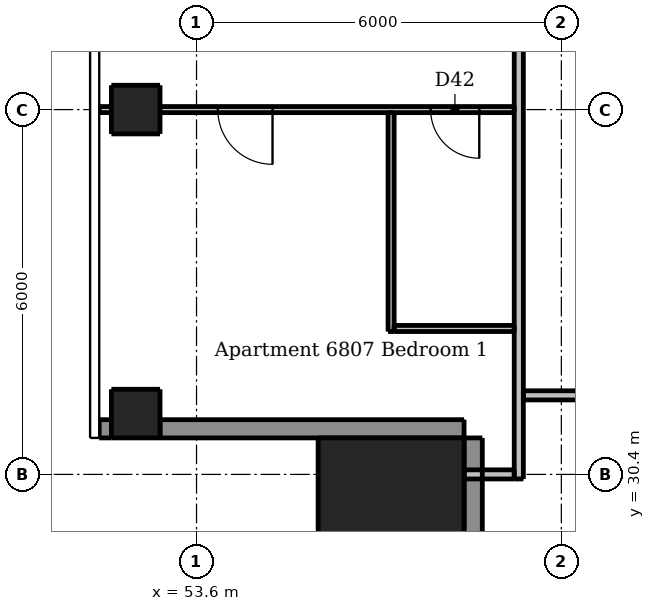
"""IFC4 building model, lengths in metres.
Left out: names, types, materials, properties, quantities, classifications, styles, units other than length and angle.
Written with IfcOpenShell. Run it as: python <this file> out.ifc"""

import sys

from ifc_helpers import new_model, si_unit, direction, frame, frame_2d, origin, origin_2d, place, context, subcontext, project, spatial, rectangle, extrude, element, fill, save


model = new_model("IFC4")
c1 = context("Model", 3, precision=1e-05, world=origin(), true_north=direction((0.0, 1.0)))
c2 = subcontext(c1, "Body", "Model", "MODEL_VIEW")
j1 = project(units=[si_unit("LENGTHUNIT", "METRE"), si_unit("PLANEANGLEUNIT", "RADIAN")], contexts=[c1])
p1 = place(None, origin())
s1 = spatial("IfcSite", under=j1, at=p1, CompositionType="ELEMENT")
p2 = place(p1, origin())
s2 = spatial("IfcBuilding", under=s1, at=p2, CompositionType="ELEMENT")
p3 = place(p2, frame((0.0, 0.0, 255.4)))
s3 = spatial("IfcBuildingStorey", under=s2, at=p3, CompositionType="ELEMENT", Elevation=255.4)
for number, where, z_axis, x_axis in (
    (1, (52.6, 31.4, 0.0), (0.0, 0.0, 1.0), (1.0, 0.0, 0.0)),
    (2, (52.6, 36.4, 0.0), (0.0, 0.0, 1.0), (1.0, 0.0, 0.0)),
):
    element("IfcColumn", number, at=place(p3, frame(where, z_axis=z_axis, x_axis=x_axis)), inside=s3, PredefinedType="COLUMN", context=c2, shape_type="SweptSolid", body=[
        extrude(rectangle(XDim=0.8, YDim=0.8, at=origin_2d()), origin(), (0.0, 0.0, 1.0), 3.05),
    ])
p4 = place(p3, frame((56.8, 29.8, 0.0), z_axis=(0.0, 0.0, 1.0), x_axis=(1.0, 0.0, 0.0)))
e3 = element("IfcColumn", 3, at=p4, inside=s3, PredefinedType="COLUMN", context=c2, shape_type="SweptSolid", body=[
    extrude(rectangle(XDim=2.4, YDim=2.4, at=origin_2d()), origin(), (0.0, 0.0, 1.0), 3.3),
])
p5 = place(p3, frame((52.0, 31.15, 0.0), z_axis=(0.0, 0.0, 1.0), x_axis=(1.0, 0.0, 0.0)))
e4 = element("IfcWall", 4, at=p5, inside=s3, PredefinedType="SOLIDWALL", context=c2, shape_type="SweptSolid", body=[
    extrude(rectangle(XDim=0.2, YDim=0.3, at=frame_2d((0.1, 0.0))), origin(), (0.0, 0.0, 1.0), 3.05),
])
p6 = place(p3, frame((53.0, 31.15, 0.0), z_axis=(0.0, 0.0, 1.0), x_axis=(1.0, 0.0, 0.0)))
e5 = element("IfcWall", 5, at=p6, inside=s3, PredefinedType="SOLIDWALL", context=c2, shape_type="SweptSolid", body=[
    extrude(rectangle(XDim=5.0, YDim=0.3, at=frame_2d((2.5, 0.0))), origin(), (0.0, 0.0, 1.0), 3.05),
])
p7 = place(p3, frame((58.15, 31.0, 0.0), z_axis=(0.0, 0.0, 1.0), x_axis=(0.0, -1.0, 0.0)))
e6 = element("IfcWall", 6, at=p7, inside=s3, PredefinedType="SOLIDWALL", context=c2, shape_type="SweptSolid", body=[
    extrude(rectangle(XDim=6.0, YDim=0.3, at=frame_2d((3.0, 0.0))), origin(), (0.0, 0.0, 1.0), 3.05),
])
p8 = place(p7, frame((1.8, 0.0, 0.15)))
e7 = element("IfcOpeningElement", 7, at=p8, cuts=e6, PredefinedType="OPENING", context=c2, shape_type="SweptSolid", body=[
    extrude(rectangle(XDim=2.4, YDim=2.1, at=frame_2d((1.2, 1.05))), frame((0.0, 0.16, 0.0), z_axis=(0.0, -1.0, 0.0), x_axis=(1.0, 0.0, 0.0)), (0.0, 0.0, 1.0), 0.32),
])
p9 = place(p3, frame((56.8, 32.75, 0.0), z_axis=(0.0, 0.0, 1.0), x_axis=(0.0, 1.0, 0.0)))
e8 = element("IfcWall", 8, at=p9, inside=s3, PredefinedType="PARTITIONING", context=c2, shape_type="SweptSolid", body=[
    extrude(rectangle(XDim=3.6, YDim=0.1, at=frame_2d((1.8, 0.0))), origin(), (0.0, 0.0, 1.0), 3.05),
])
p10 = place(p3, frame((58.825, 36.4, 0.0), z_axis=(0.0, 0.0, 1.0), x_axis=(-1.0, 0.0, 0.0)))
e9 = element("IfcWall", 9, at=p10, inside=s3, PredefinedType="PARTITIONING", context=c2, shape_type="SweptSolid", body=[
    extrude(rectangle(XDim=6.825, YDim=0.1, at=frame_2d((3.413, 0.0))), origin(), (0.0, 0.0, 1.0), 2.516),
])
p11 = place(p10, frame((3.975, 0.0, 0.0)))
e10 = element("IfcOpeningElement", 10, at=p11, cuts=e9, PredefinedType="OPENING", context=c2, shape_type="SweptSolid", body=[
    extrude(rectangle(XDim=0.9, YDim=2.1, at=frame_2d((0.45, 1.05))), frame((0.0, 0.06, 0.0), z_axis=(0.0, -1.0, 0.0), x_axis=(1.0, 0.0, 0.0)), (0.0, 0.0, 1.0), 0.12),
])
p12 = place(p10, frame((0.575, 0.0, 0.0)))
e11 = element("IfcOpeningElement", 11, at=p12, cuts=e9, PredefinedType="OPENING", context=c2, shape_type="SweptSolid", body=[
    extrude(rectangle(XDim=0.8, YDim=2.1, at=frame_2d((0.4, 1.05))), frame((0.0, 0.06, 0.0), z_axis=(0.0, -1.0, 0.0), x_axis=(1.0, 0.0, 0.0)), (0.0, 0.0, 1.0), 0.12),
])
p13 = place(p3, frame((56.85, 32.8, 0.0), z_axis=(0.0, 0.0, 1.0), x_axis=(1.0, 0.0, 0.0)))
e12 = element("IfcWall", 12, at=p13, inside=s3, PredefinedType="PARTITIONING", context=c2, shape_type="SweptSolid", body=[
    extrude(rectangle(XDim=1.975, YDim=0.1, at=frame_2d((0.987, 0.0))), origin(), (0.0, 0.0, 1.0), 3.05),
])
p14 = place(p3, frame((58.9, 30.325, 0.0), z_axis=(0.0, 0.0, 1.0), x_axis=(0.0, 1.0, 0.0)))
e13 = element("IfcWall", 13, at=p14, inside=s3, PredefinedType="PARTITIONING", context=c2, shape_type="SweptSolid", body=[
    extrude(rectangle(XDim=30.85, YDim=0.15, at=frame_2d((15.425, 0.0))), origin(), (0.0, 0.0, 1.0), 3.05),
])
p15 = place(p14, frame((7.375, 0.0, 0.0)))
e14 = element("IfcOpeningElement", 14, at=p15, cuts=e13, PredefinedType="OPENING", context=c2, shape_type="SweptSolid", body=[
    extrude(rectangle(XDim=1.0, YDim=2.1, at=frame_2d((0.5, 1.05))), frame((0.0, 0.085, 0.0), z_axis=(0.0, -1.0, 0.0), x_axis=(1.0, 0.0, 0.0)), (0.0, 0.0, 1.0), 0.17),
])
p16 = place(p14, frame((26.925, 0.0, 0.0)))
e15 = element("IfcOpeningElement", 15, at=p16, cuts=e13, PredefinedType="OPENING", context=c2, shape_type="SweptSolid", body=[
    extrude(rectangle(XDim=1.0, YDim=2.1, at=frame_2d((0.5, 1.05))), frame((0.0, 0.085, 0.0), z_axis=(0.0, -1.0, 0.0), x_axis=(1.0, 0.0, 0.0)), (0.0, 0.0, 1.0), 0.17),
])
p17 = place(p3, frame((89.525, 31.7, 0.0), z_axis=(0.0, 0.0, 1.0), x_axis=(-1.0, 0.0, 0.0)))
e16 = element("IfcWall", 16, at=p17, inside=s3, PredefinedType="PARTITIONING", context=c2, shape_type="SweptSolid", body=[
    extrude(rectangle(XDim=30.55, YDim=0.15, at=frame_2d((15.275, 0.0))), origin(), (0.0, 0.0, 1.0), 3.05),
])
p18 = place(p17, frame((26.775, 0.0, 0.0)))
e17 = element("IfcOpeningElement", 17, at=p18, cuts=e16, PredefinedType="OPENING", context=c2, shape_type="SweptSolid", body=[
    extrude(rectangle(XDim=1.0, YDim=2.1, at=frame_2d((0.5, 1.05))), frame((0.0, 0.085, 0.0), z_axis=(0.0, -1.0, 0.0), x_axis=(1.0, 0.0, 0.0)), (0.0, 0.0, 1.0), 0.17),
])
p19 = place(p17, frame((6.925, 0.0, 0.0)))
e18 = element("IfcOpeningElement", 18, at=p19, cuts=e16, PredefinedType="OPENING", context=c2, shape_type="SweptSolid", body=[
    extrude(rectangle(XDim=1.0, YDim=2.1, at=frame_2d((0.5, 1.05))), frame((0.0, 0.085, 0.0), z_axis=(0.0, -1.0, 0.0), x_axis=(1.0, 0.0, 0.0)), (0.0, 0.0, 1.0), 0.17),
])
p20 = place(p3, frame((58.0, 30.4, 0.0), z_axis=(0.0, 0.0, 1.0), x_axis=(1.0, 0.0, 0.0)))
e19 = element("IfcWall", 19, at=p20, inside=s3, PredefinedType="PARTITIONING", context=c2, shape_type="SweptSolid", body=[
    extrude(rectangle(XDim=0.825, YDim=0.15, at=frame_2d((0.413, 0.0))), origin(), (0.0, 0.0, 1.0), 3.05),
])
p21 = place(p11, origin())
e20 = element("IfcDoor", 20, at=p21, inside=s3, OperationType="SINGLE_SWING_LEFT", PredefinedType="DOOR", context=c2, shape_type="SweptSolid", body=[
    extrude(rectangle(XDim=0.9, YDim=2.1, at=frame_2d((0.45, 1.05))), frame((0.0, 0.025, 0.0), z_axis=(0.0, -1.0, 0.0), x_axis=(1.0, 0.0, 0.0)), (0.0, 0.0, 1.0), 0.05),
])
fill(e10, e20)
p22 = place(p12, origin())
e21 = element("IfcDoor", 21, at=p22, inside=s3, OperationType="SINGLE_SWING_LEFT", PredefinedType="DOOR", context=c2, shape_type="SweptSolid", body=[
    extrude(rectangle(XDim=0.8, YDim=2.1, at=frame_2d((0.4, 1.05))), frame((0.0, 0.025, 0.0), z_axis=(0.0, -1.0, 0.0), x_axis=(1.0, 0.0, 0.0)), (0.0, 0.0, 1.0), 0.05),
])
fill(e11, e21)
save(model, sys.argv[1])
